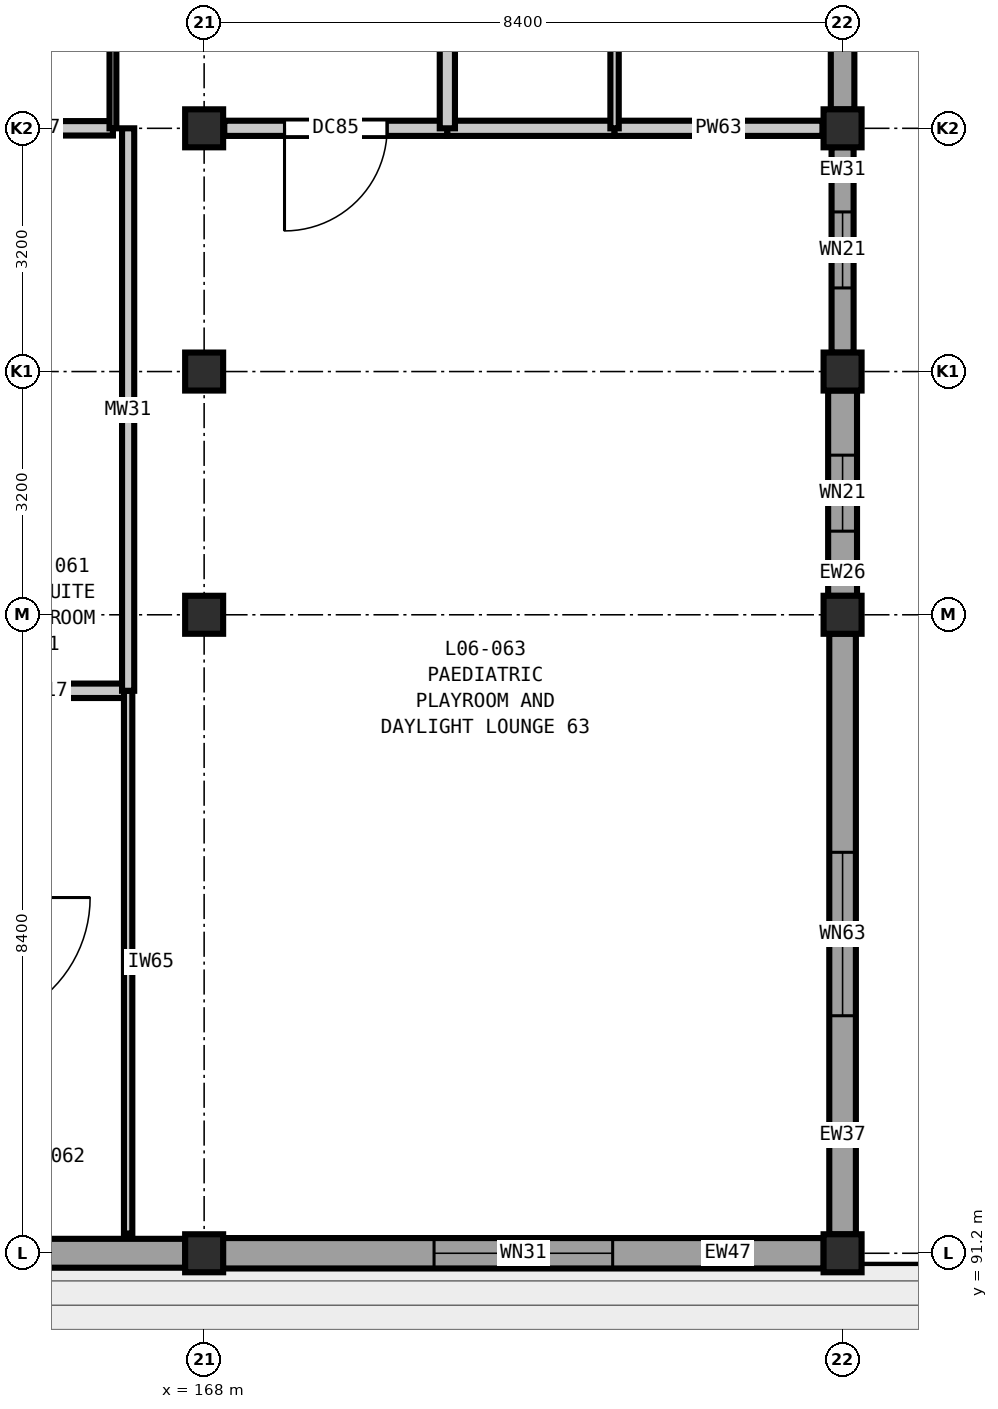
"""IFC4 building model, lengths in metres.
Left out: names, types, materials, properties, quantities, classifications, styles, units other than length and angle.
Written with IfcOpenShell. Run it as: python <this file> out.ifc"""

import sys

from ifc_helpers import new_model, si_unit, direction, frame, frame_2d, origin, origin_2d, place, context, subcontext, project, spatial, rectangle, extrude, element, fill, save


model = new_model("IFC4")
c1 = context("Model", 3, precision=1e-05, world=origin(), true_north=direction((0.0, 1.0)))
c2 = subcontext(c1, "Body", "Model", "MODEL_VIEW")
j1 = project(units=[si_unit("LENGTHUNIT", "METRE"), si_unit("PLANEANGLEUNIT", "RADIAN")], contexts=[c1])
p1 = place(None, origin())
s1 = spatial("IfcSite", under=j1, at=p1, CompositionType="ELEMENT")
p2 = place(p1, origin())
s2 = spatial("IfcBuilding", under=s1, at=p2, CompositionType="ELEMENT")
p3 = place(p2, frame((0.0, 0.0, 28.8)))
s3 = spatial("IfcBuildingStorey", under=s2, at=p3, CompositionType="ELEMENT", Elevation=28.8)
for number, where, z_axis, x_axis in (
    (1, (168.0, 91.2, 0.0), (0.0, 0.0, 1.0), (1.0, 0.0, 0.0)),
    (2, (168.0, 99.6, 0.0), (0.0, 0.0, 1.0), (1.0, 0.0, 0.0)),
    (3, (168.0, 102.8, 0.0), (0.0, 0.0, 1.0), (1.0, 0.0, 0.0)),
    (4, (168.0, 106.0, 0.0), (0.0, 0.0, 1.0), (1.0, 0.0, 0.0)),
    (5, (176.4, 91.2, 0.0), (0.0, 0.0, 1.0), (1.0, 0.0, 0.0)),
    (6, (176.4, 99.6, 0.0), (0.0, 0.0, 1.0), (1.0, 0.0, 0.0)),
    (7, (176.4, 102.8, 0.0), (0.0, 0.0, 1.0), (1.0, 0.0, 0.0)),
    (8, (176.4, 106.0, 0.0), (0.0, 0.0, 1.0), (1.0, 0.0, 0.0)),
):
    element("IfcColumn", number, at=place(p3, frame(where, z_axis=z_axis, x_axis=x_axis)), inside=s3, PredefinedType="COLUMN", context=c2, shape_type="SweptSolid", body=[
        extrude(rectangle(XDim=0.5, YDim=0.5, at=origin_2d()), origin(), (0.0, 0.0, 1.0), 4.2),
    ])
p4 = place(p3, frame((176.4, 108.952, 0.0), z_axis=(0.0, 0.0, 1.0), x_axis=(0.0, -1.0, 0.0)))
e9 = element("IfcWall", 9, at=p4, inside=s3, PredefinedType="SOLIDWALL", context=c2, shape_type="SweptSolid", body=[
    extrude(rectangle(XDim=2.704, YDim=0.31, at=frame_2d((1.352, 0.0))), origin(), (0.0, 0.0, 1.0), 3.48),
])
p5 = place(p4, frame((0.852, 0.0, 0.9)))
e10 = element("IfcOpeningElement", 10, at=p5, cuts=e9, PredefinedType="OPENING", context=c2, shape_type="SweptSolid", body=[
    extrude(rectangle(XDim=1.0, YDim=1.55, at=frame_2d((0.5, 0.775))), frame((0.0, 0.165, 0.0), z_axis=(0.0, -1.0, 0.0), x_axis=(1.0, 0.0, 0.0)), (0.0, 0.0, 1.0), 0.33),
])
p6 = place(p3, frame((176.4, 105.752, 0.0), z_axis=(0.0, 0.0, 1.0), x_axis=(0.0, -1.0, 0.0)))
e11 = element("IfcWall", 11, at=p6, inside=s3, PredefinedType="SOLIDWALL", context=c2, shape_type="SweptSolid", body=[
    extrude(rectangle(XDim=2.704, YDim=0.29, at=frame_2d((1.352, 0.0))), origin(), (0.0, 0.0, 1.0), 3.48),
])
p7 = place(p6, frame((0.852, 0.0, 0.9)))
e12 = element("IfcOpeningElement", 12, at=p7, cuts=e11, PredefinedType="OPENING", context=c2, shape_type="SweptSolid", body=[
    extrude(rectangle(XDim=1.0, YDim=1.55, at=frame_2d((0.5, 0.775))), frame((0.0, 0.155, 0.0), z_axis=(0.0, -1.0, 0.0), x_axis=(1.0, 0.0, 0.0)), (0.0, 0.0, 1.0), 0.31),
])
p8 = place(p3, frame((176.4, 102.552, 0.0), z_axis=(0.0, 0.0, 1.0), x_axis=(0.0, -1.0, 0.0)))
e13 = element("IfcWall", 13, at=p8, inside=s3, PredefinedType="SOLIDWALL", context=c2, shape_type="SweptSolid", body=[
    extrude(rectangle(XDim=2.704, YDim=0.38, at=frame_2d((1.352, 0.0))), origin(), (0.0, 0.0, 1.0), 3.48),
])
p9 = place(p8, frame((0.852, 0.0, 0.9)))
e14 = element("IfcOpeningElement", 14, at=p9, cuts=e13, PredefinedType="OPENING", context=c2, shape_type="SweptSolid", body=[
    extrude(rectangle(XDim=1.0, YDim=1.55, at=frame_2d((0.5, 0.775))), frame((0.0, 0.2, 0.0), z_axis=(0.0, -1.0, 0.0), x_axis=(1.0, 0.0, 0.0)), (0.0, 0.0, 1.0), 0.4),
])
p10 = place(p3, frame((176.4, 99.352, 0.0), z_axis=(0.0, 0.0, 1.0), x_axis=(0.0, -1.0, 0.0)))
e15 = element("IfcWall", 15, at=p10, inside=s3, PredefinedType="SOLIDWALL", context=c2, shape_type="SweptSolid", body=[
    extrude(rectangle(XDim=7.904, YDim=0.35, at=frame_2d((3.952, 0.0))), origin(), (0.0, 0.0, 1.0), 3.48),
])
p11 = place(p10, frame((2.877, 0.0, 0.9)))
e16 = element("IfcOpeningElement", 16, at=p11, cuts=e15, PredefinedType="OPENING", context=c2, shape_type="SweptSolid", body=[
    extrude(rectangle(XDim=2.15, YDim=1.75, at=frame_2d((1.075, 0.875))), frame((0.0, 0.185, 0.0), z_axis=(0.0, -1.0, 0.0), x_axis=(1.0, 0.0, 0.0)), (0.0, 0.0, 1.0), 0.37),
])
p12 = place(p3, frame((176.152, 91.2, 0.0), z_axis=(0.0, 0.0, 1.0), x_axis=(-1.0, 0.0, 0.0)))
e17 = element("IfcWall", 17, at=p12, inside=s3, PredefinedType="SOLIDWALL", context=c2, shape_type="SweptSolid", body=[
    extrude(rectangle(XDim=7.904, YDim=0.4, at=frame_2d((3.952, 0.0))), origin(), (0.0, 0.0, 1.0), 3.48),
])
p13 = place(p12, frame((2.777, 0.0, 0.9)))
e18 = element("IfcOpeningElement", 18, at=p13, cuts=e17, PredefinedType="OPENING", context=c2, shape_type="SweptSolid", body=[
    extrude(rectangle(XDim=2.35, YDim=1.75, at=frame_2d((1.175, 0.875))), frame((0.0, 0.21, 0.0), z_axis=(0.0, -1.0, 0.0), x_axis=(1.0, 0.0, 0.0)), (0.0, 0.0, 1.0), 0.42),
])
p14 = place(p3, frame((167.752, 91.2, 0.0), z_axis=(0.0, 0.0, 1.0), x_axis=(-1.0, 0.0, 0.0)))
e19 = element("IfcWall", 19, at=p14, inside=s3, PredefinedType="SOLIDWALL", context=c2, shape_type="SweptSolid", body=[
    extrude(rectangle(XDim=7.904, YDim=0.38, at=frame_2d((3.952, 0.0))), origin(), (0.0, 0.0, 1.0), 3.48),
])
p15 = place(p14, frame((4.701, 0.0, 0.9)))
e20 = element("IfcOpeningElement", 20, at=p15, cuts=e19, PredefinedType="OPENING", context=c2, shape_type="SweptSolid", body=[
    extrude(rectangle(XDim=1.1, YDim=1.95, at=frame_2d((0.55, 0.975))), frame((0.0, 0.2, 0.0), z_axis=(0.0, -1.0, 0.0), x_axis=(1.0, 0.0, 0.0)), (0.0, 0.0, 1.0), 0.4),
])
p16 = place(p3, frame((164.8, 98.6, 0.0), z_axis=(0.0, 0.0, 1.0), x_axis=(1.0, 0.0, 0.0)))
e21 = element("IfcWall", 21, at=p16, inside=s3, PredefinedType="PLUMBINGWALL", context=c2, shape_type="SweptSolid", body=[
    extrude(rectangle(XDim=2.2, YDim=0.19, at=frame_2d((1.1, 0.0))), origin(), (0.0, 0.0, 1.0), 3.92),
])
p17 = place(p3, frame((164.8, 106.0, 0.0), z_axis=(0.0, 0.0, 1.0), x_axis=(1.0, 0.0, 0.0)))
e22 = element("IfcWall", 22, at=p17, inside=s3, PredefinedType="PLUMBINGWALL", context=c2, shape_type="SweptSolid", body=[
    extrude(rectangle(XDim=2.0, YDim=0.19, at=frame_2d((1.0, 0.0))), origin(), (0.0, 0.0, 1.0), 3.635),
])
p18 = place(p3, frame((168.265, 106.0, 0.0), z_axis=(0.0, 0.0, 1.0), x_axis=(1.0, 0.0, 0.0)))
e23 = element("IfcWall", 23, at=p18, inside=s3, PredefinedType="PARTITIONING", context=c2, shape_type="SweptSolid", body=[
    extrude(rectangle(XDim=2.935, YDim=0.2, at=frame_2d((1.468, 0.0))), origin(), (0.0, 0.0, 1.0), 3.635),
])
p19 = place(p18, frame((0.792, 0.0, 0.0)))
e24 = element("IfcOpeningElement", 24, at=p19, cuts=e23, PredefinedType="OPENING", context=c2, shape_type="SweptSolid", body=[
    extrude(rectangle(XDim=1.35, YDim=2.2, at=frame_2d((0.675, 1.1))), frame((0.0, 0.11, 0.0), z_axis=(0.0, -1.0, 0.0), x_axis=(1.0, 0.0, 0.0)), (0.0, 0.0, 1.0), 0.22),
])
p20 = place(p3, frame((171.2, 106.0, 0.0), z_axis=(0.0, 0.0, 1.0), x_axis=(1.0, 0.0, 0.0)))
e25 = element("IfcWall", 25, at=p20, inside=s3, PredefinedType="PARTITIONING", context=c2, shape_type="SweptSolid", body=[
    extrude(rectangle(XDim=2.2, YDim=0.2, at=frame_2d((1.1, 0.0))), origin(), (0.0, 0.0, 1.0), 3.635),
])
p21 = place(p3, frame((173.4, 106.0, 0.0), z_axis=(0.0, 0.0, 1.0), x_axis=(1.0, 0.0, 0.0)))
e26 = element("IfcWall", 26, at=p21, inside=s3, PredefinedType="PARTITIONING", context=c2, shape_type="SweptSolid", body=[
    extrude(rectangle(XDim=2.735, YDim=0.2, at=frame_2d((1.368, 0.0))), origin(), (0.0, 0.0, 1.0), 3.635),
])
p22 = place(p3, frame((166.8, 106.0, 0.0), z_axis=(0.0, 0.0, 1.0), x_axis=(0.0, 1.0, 0.0)))
e27 = element("IfcWall", 27, at=p22, inside=s3, PredefinedType="PARTITIONING", context=c2, shape_type="SweptSolid", body=[
    extrude(rectangle(XDim=7.2, YDim=0.09, at=frame_2d((3.6, 0.0))), origin(), (0.0, 0.0, 1.0), 3.92),
])
p23 = place(p3, frame((167.0, 91.46, 0.0), z_axis=(0.0, 0.0, 1.0), x_axis=(0.0, 1.0, 0.0)))
e28 = element("IfcWall", 28, at=p23, inside=s3, PredefinedType="PARTITIONING", context=c2, shape_type="SweptSolid", body=[
    extrude(rectangle(XDim=7.14, YDim=0.11, at=frame_2d((3.57, 0.0))), origin(), (0.0, 0.0, 1.0), 3.92),
])
p24 = place(p3, frame((167.0, 98.6, 0.0), z_axis=(0.0, 0.0, 1.0), x_axis=(0.0, 1.0, 0.0)))
e29 = element("IfcWall", 29, at=p24, inside=s3, PredefinedType="PLUMBINGWALL", context=c2, shape_type="SweptSolid", body=[
    extrude(rectangle(XDim=7.4, YDim=0.16, at=frame_2d((3.7, 0.0))), origin(), (0.0, 0.0, 1.0), 3.92),
])
p25 = place(p3, frame((171.2, 106.0, 0.0), z_axis=(0.0, 0.0, 1.0), x_axis=(0.0, 1.0, 0.0)))
e30 = element("IfcWall", 30, at=p25, inside=s3, PredefinedType="PARTITIONING", context=c2, shape_type="SweptSolid", body=[
    extrude(rectangle(XDim=3.6, YDim=0.2, at=frame_2d((1.8, 0.0))), origin(), (0.0, 0.0, 1.0), 3.92),
])
p26 = place(p25, frame((1.175, 0.0, 0.0)))
e31 = element("IfcOpeningElement", 31, at=p26, cuts=e30, PredefinedType="OPENING", context=c2, shape_type="SweptSolid", body=[
    extrude(rectangle(XDim=1.25, YDim=2.15, at=frame_2d((0.625, 1.075))), frame((0.0, 0.11, 0.0), z_axis=(0.0, -1.0, 0.0), x_axis=(1.0, 0.0, 0.0)), (0.0, 0.0, 1.0), 0.22),
])
p27 = place(p3, frame((173.4, 106.0, 0.0), z_axis=(0.0, 0.0, 1.0), x_axis=(0.0, 1.0, 0.0)))
e32 = element("IfcWall", 32, at=p27, inside=s3, PredefinedType="PARTITIONING", context=c2, shape_type="SweptSolid", body=[
    extrude(rectangle(XDim=3.6, YDim=0.11, at=frame_2d((1.8, 0.0))), origin(), (0.0, 0.0, 1.0), 3.92),
])
p28 = place(p7, origin())
e33 = element("IfcWindow", 33, at=p28, inside=s3, PartitioningType="SINGLE_PANEL", PredefinedType="WINDOW", context=c2, shape_type="SweptSolid", body=[
    extrude(rectangle(XDim=1.0, YDim=1.55, at=frame_2d((0.5, 0.775))), frame((0.0, 0.03, 0.0), z_axis=(0.0, -1.0, 0.0), x_axis=(1.0, 0.0, 0.0)), (0.0, 0.0, 1.0), 0.06),
])
fill(e12, e33)
p29 = place(p9, origin())
e34 = element("IfcWindow", 34, at=p29, inside=s3, PartitioningType="SINGLE_PANEL", PredefinedType="WINDOW", context=c2, shape_type="SweptSolid", body=[
    extrude(rectangle(XDim=1.0, YDim=1.55, at=frame_2d((0.5, 0.775))), frame((0.0, 0.03, 0.0), z_axis=(0.0, -1.0, 0.0), x_axis=(1.0, 0.0, 0.0)), (0.0, 0.0, 1.0), 0.06),
])
fill(e14, e34)
p30 = place(p11, origin())
e35 = element("IfcWindow", 35, at=p30, inside=s3, PartitioningType="DOUBLE_PANEL_VERTICAL", PredefinedType="WINDOW", context=c2, shape_type="SweptSolid", body=[
    extrude(rectangle(XDim=2.15, YDim=1.75, at=frame_2d((1.075, 0.875))), frame((0.0, 0.03, 0.0), z_axis=(0.0, -1.0, 0.0), x_axis=(1.0, 0.0, 0.0)), (0.0, 0.0, 1.0), 0.06),
])
fill(e16, e35)
p31 = place(p13, origin())
e36 = element("IfcWindow", 36, at=p31, inside=s3, PartitioningType="DOUBLE_PANEL_VERTICAL", PredefinedType="WINDOW", context=c2, shape_type="SweptSolid", body=[
    extrude(rectangle(XDim=2.35, YDim=1.75, at=frame_2d((1.175, 0.875))), frame((0.0, 0.03, 0.0), z_axis=(0.0, -1.0, 0.0), x_axis=(1.0, 0.0, 0.0)), (0.0, 0.0, 1.0), 0.06),
])
fill(e18, e36)
p32 = place(p19, frame((1.35, 0.0, 0.0), z_axis=(0.0, 0.0, 1.0), x_axis=(-1.0, 0.0, 0.0)))
e37 = element("IfcDoor", 37, at=p32, inside=s3, OperationType="SINGLE_SWING_RIGHT", PredefinedType="DOOR", context=c2, shape_type="SweptSolid", body=[
    extrude(rectangle(XDim=1.35, YDim=2.2, at=frame_2d((0.675, 1.1))), frame((0.0, 0.025, 0.0), z_axis=(0.0, -1.0, 0.0), x_axis=(1.0, 0.0, 0.0)), (0.0, 0.0, 1.0), 0.05),
])
fill(e24, e37)
save(model, sys.argv[1])
